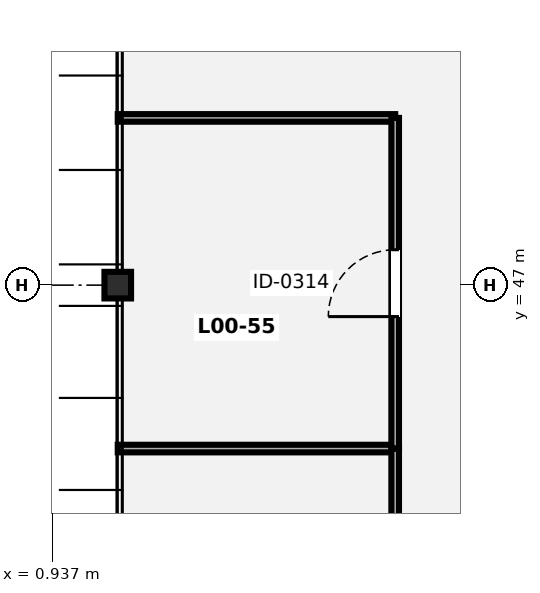
"""IFC4 building model, lengths in metres.
Left out: names, types, materials, properties, quantities, classifications, styles, units other than length and angle.
Written with IfcOpenShell. Run it as: python <this file> out.ifc"""

import sys

from ifc_helpers import new_model, si_unit, direction, frame, frame_2d, origin, origin_2d, place, context, subcontext, project, spatial, rectangle, i_section, extrude, element, fill, save


model = new_model("IFC4")
c1 = context("Model", 3, precision=1e-05, world=origin(), true_north=direction((0.0, 1.0)))
c2 = subcontext(c1, "Body", "Model", "MODEL_VIEW")
j1 = project(units=[si_unit("LENGTHUNIT", "METRE"), si_unit("PLANEANGLEUNIT", "RADIAN")], contexts=[c1])
p1 = place(None, origin())
s1 = spatial("IfcSite", under=j1, at=p1, CompositionType="ELEMENT")
p2 = place(p1, origin())
s2 = spatial("IfcBuilding", under=s1, at=p2, CompositionType="ELEMENT")
p3 = place(p2, origin())
s3 = spatial("IfcBuildingStorey", under=s2, at=p3, CompositionType="ELEMENT", Elevation=0.0)
p4 = place(p3, frame((1.8, 47.0, 0.0), z_axis=(0.0, 0.0, 1.0), x_axis=(1.0, 0.0, 0.0)))
e1 = element("IfcColumn", 1, at=p4, inside=s3, PredefinedType="COLUMN", context=c2, shape_type="SweptSolid", body=[
    extrude(i_section(OverallWidth=0.35, OverallDepth=0.35, WebThickness=0.02, FlangeThickness=0.032, FilletRadius=0.016, at=origin_2d()), origin(), (0.0, 0.0, 1.0), 4.9),
])
p5 = place(p3, frame((1.8, 44.85, 0.0), z_axis=(0.0, 0.0, 1.0), x_axis=(1.0, 0.0, 0.0)))
e2 = element("IfcWall", 2, at=p5, inside=s3, PredefinedType="PARTITIONING", context=c2, shape_type="SweptSolid", body=[
    extrude(rectangle(XDim=3.65, YDim=0.1, at=frame_2d((1.825, 0.0))), origin(), (0.0, 0.0, 1.0), 4.7),
])
p6 = place(p3, frame((5.45, 41.6, 0.0), z_axis=(0.0, 0.0, 1.0), x_axis=(0.0, 1.0, 0.0)))
e3 = element("IfcWall", 3, at=p6, inside=s3, PredefinedType="PARTITIONING", context=c2, shape_type="SweptSolid", body=[
    extrude(rectangle(XDim=3.25, YDim=0.1, at=frame_2d((1.625, 0.0))), origin(), (0.0, 0.0, 1.0), 4.7),
])
p7 = place(p6, frame((1.125, 0.0, 0.0)))
e4 = element("IfcOpeningElement", 4, at=p7, cuts=e3, PredefinedType="OPENING", context=c2, shape_type="SweptSolid", body=[
    extrude(rectangle(XDim=1.0, YDim=2.1, at=frame_2d((0.5, 1.05))), frame((0.0, 0.06, 0.0), z_axis=(0.0, -1.0, 0.0), x_axis=(1.0, 0.0, 0.0)), (0.0, 0.0, 1.0), 0.12),
])
p8 = place(p3, frame((1.8, 49.2, 0.0), z_axis=(0.0, 0.0, 1.0), x_axis=(1.0, 0.0, 0.0)))
e5 = element("IfcWall", 5, at=p8, inside=s3, PredefinedType="PARTITIONING", context=c2, shape_type="SweptSolid", body=[
    extrude(rectangle(XDim=3.65, YDim=0.1, at=frame_2d((1.825, 0.0))), origin(), (0.0, 0.0, 1.0), 4.7),
])
p9 = place(p3, frame((5.45, 44.852, 0.0), z_axis=(0.0, 0.0, 1.0), x_axis=(0.0, 1.0, 0.0)))
e6 = element("IfcWall", 6, at=p9, inside=s3, PredefinedType="PARTITIONING", context=c2, shape_type="SweptSolid", body=[
    extrude(rectangle(XDim=4.348, YDim=0.1, at=frame_2d((2.174, 0.0))), origin(), (0.0, 0.0, 1.0), 4.7),
])
p10 = place(p9, frame((1.734, 0.0, 0.0)))
e7 = element("IfcOpeningElement", 7, at=p10, cuts=e6, PredefinedType="OPENING", context=c2, shape_type="SweptSolid", body=[
    extrude(rectangle(XDim=0.88, YDim=2.08, at=frame_2d((0.44, 1.04))), frame((0.0, 0.06, 0.0), z_axis=(0.0, -1.0, 0.0), x_axis=(1.0, 0.0, 0.0)), (0.0, 0.0, 1.0), 0.12),
])
p11 = place(p10, origin())
e8 = element("IfcDoor", 8, at=p11, inside=s3, OperationType="SINGLE_SWING_LEFT", PredefinedType="DOOR", context=c2, shape_type="SweptSolid", body=[
    extrude(rectangle(XDim=0.88, YDim=2.08, at=frame_2d((0.44, 1.04))), frame((0.0, 0.025, 0.0), z_axis=(0.0, -1.0, 0.0), x_axis=(1.0, 0.0, 0.0)), (0.0, 0.0, 1.0), 0.05),
])
fill(e7, e8)
save(model, sys.argv[1])
